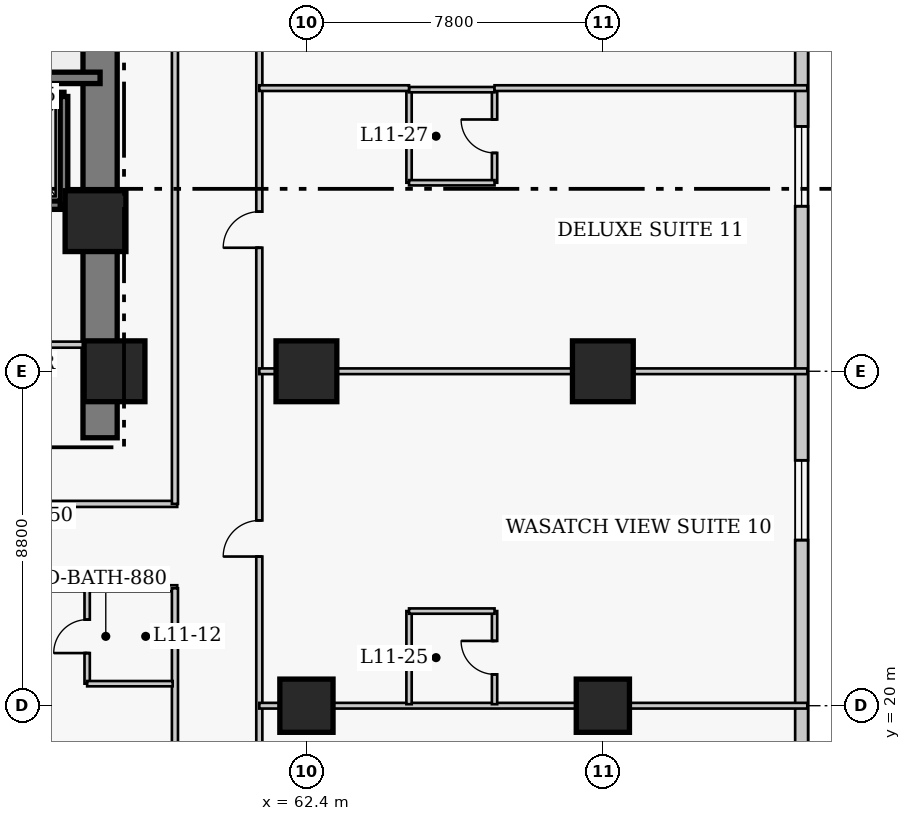
"""IFC4 building model, lengths in metres.
Left out: names, types, materials, properties, quantities, classifications, styles, units other than length and angle.
Written with IfcOpenShell. Run it as: python <this file> out.ifc"""

import sys

from ifc_helpers import new_model, si_unit, direction, frame, frame_2d, origin, origin_2d, place, context, subcontext, project, spatial, rectangle, extrude, element, fill, save


model = new_model("IFC4")
c1 = context("Model", 3, precision=1e-05, world=origin(), true_north=direction((0.0, 1.0)))
c2 = subcontext(c1, "Body", "Model", "MODEL_VIEW")
j1 = project(units=[si_unit("LENGTHUNIT", "METRE"), si_unit("PLANEANGLEUNIT", "RADIAN")], contexts=[c1])
p1 = place(None, origin())
s1 = spatial("IfcSite", under=j1, at=p1, CompositionType="ELEMENT")
p2 = place(p1, origin())
s2 = spatial("IfcBuilding", under=s1, at=p2, CompositionType="ELEMENT")
p3 = place(p2, frame((0.0, 0.0, 48.8)))
s3 = spatial("IfcBuildingStorey", under=s2, at=p3, CompositionType="ELEMENT", Elevation=48.8)
p4 = place(p3, frame((56.97, 27.05, 0.0), z_axis=(0.0, 0.0, 1.0), x_axis=(0.0, 1.0, 0.0)))
e1 = element("IfcWall", 1, at=p4, inside=s3, PredefinedType="SHEAR", context=c2, shape_type="SweptSolid", body=[
    extrude(rectangle(XDim=13.72, YDim=0.9, at=frame_2d((6.86, 0.0))), origin(), (0.0, 0.0, 1.0), 3.8),
])
p5 = place(p3, frame((48.45, 36.52, 0.0), z_axis=(0.0, 0.0, 1.0), x_axis=(1.0, 0.0, 0.0)))
e2 = element("IfcWall", 2, at=p5, inside=s3, PredefinedType="SHEAR", context=c2, shape_type="SweptSolid", body=[
    extrude(rectangle(XDim=8.52, YDim=0.3, at=frame_2d((4.26, 0.0))), origin(), (0.0, 0.0, 1.0), 3.8),
])
p6 = place(p3, frame((62.4, 20.0, 0.0), z_axis=(0.0, 0.0, 1.0), x_axis=(1.0, 0.0, 0.0)))
e3 = element("IfcColumn", 3, at=p6, inside=s3, PredefinedType="COLUMN", context=c2, shape_type="SweptSolid", body=[
    extrude(rectangle(XDim=1.4, YDim=1.4, at=origin_2d()), origin(), (0.0, 0.0, 1.0), 3.8),
])
p7 = place(p3, frame((62.4, 28.8, 0.0), z_axis=(0.0, 0.0, 1.0), x_axis=(1.0, 0.0, 0.0)))
e4 = element("IfcColumn", 4, at=p7, inside=s3, PredefinedType="COLUMN", context=c2, shape_type="SweptSolid", body=[
    extrude(rectangle(XDim=1.6, YDim=1.6, at=origin_2d()), origin(), (0.0, 0.0, 1.0), 3.8),
])
p8 = place(p3, frame((70.2, 20.0, 0.0), z_axis=(0.0, 0.0, 1.0), x_axis=(1.0, 0.0, 0.0)))
e5 = element("IfcColumn", 5, at=p8, inside=s3, PredefinedType="COLUMN", context=c2, shape_type="SweptSolid", body=[
    extrude(rectangle(XDim=1.4, YDim=1.4, at=origin_2d()), origin(), (0.0, 0.0, 1.0), 3.8),
])
for number, where, z_axis, x_axis in (
    (6, (70.2, 28.8, 0.0), (0.0, 0.0, 1.0), (1.0, 0.0, 0.0)),
    (7, (57.35, 28.8, 0.0), (0.0, 0.0, 1.0), (1.0, 0.0, 0.0)),
    (8, (56.85, 32.75, 0.0), (0.0, 0.0, 1.0), (1.0, 0.0, 0.0)),
):
    element("IfcColumn", number, at=place(p3, frame(where, z_axis=z_axis, x_axis=x_axis)), inside=s3, PredefinedType="COLUMN", context=c2, shape_type="SweptSolid", body=[
        extrude(rectangle(XDim=1.6, YDim=1.6, at=origin_2d()), origin(), (0.0, 0.0, 1.0), 3.8),
    ])
p9 = place(p3, frame((75.43, 12.23, 0.0), z_axis=(0.0, 0.0, 1.0), x_axis=(0.0, 1.0, 0.0)))
e9 = element("IfcWall", 9, at=p9, inside=s3, PredefinedType="SOLIDWALL", context=c2, shape_type="SweptSolid", body=[
    extrude(rectangle(XDim=35.14, YDim=0.34, at=frame_2d((17.57, 0.0))), origin(), (0.0, 0.0, 1.0), 3.54),
])
p10 = place(p9, frame((3.343, 0.0, 0.85)))
e10 = element("IfcOpeningElement", 10, at=p10, cuts=e9, PredefinedType="OPENING", context=c2, shape_type="SweptSolid", body=[
    extrude(rectangle(XDim=2.1, YDim=1.85, at=frame_2d((1.05, 0.925))), frame((0.0, 0.18, 0.0), z_axis=(0.0, -1.0, 0.0), x_axis=(1.0, 0.0, 0.0)), (0.0, 0.0, 1.0), 0.36),
])
p11 = place(p9, frame((12.127, 0.0, 0.85)))
e11 = element("IfcOpeningElement", 11, at=p11, cuts=e9, PredefinedType="OPENING", context=c2, shape_type="SweptSolid", body=[
    extrude(rectangle(XDim=2.1, YDim=1.85, at=frame_2d((1.05, 0.925))), frame((0.0, 0.18, 0.0), z_axis=(0.0, -1.0, 0.0), x_axis=(1.0, 0.0, 0.0)), (0.0, 0.0, 1.0), 0.36),
])
p12 = place(p9, frame((20.913, 0.0, 0.85)))
e12 = element("IfcOpeningElement", 12, at=p12, cuts=e9, PredefinedType="OPENING", context=c2, shape_type="SweptSolid", body=[
    extrude(rectangle(XDim=2.1, YDim=1.85, at=frame_2d((1.05, 0.925))), frame((0.0, 0.18, 0.0), z_axis=(0.0, -1.0, 0.0), x_axis=(1.0, 0.0, 0.0)), (0.0, 0.0, 1.0), 0.36),
])
p13 = place(p9, frame((29.698, 0.0, 0.85)))
e13 = element("IfcOpeningElement", 13, at=p13, cuts=e9, PredefinedType="OPENING", context=c2, shape_type="SweptSolid", body=[
    extrude(rectangle(XDim=2.1, YDim=1.85, at=frame_2d((1.05, 0.925))), frame((0.0, 0.18, 0.0), z_axis=(0.0, -1.0, 0.0), x_axis=(1.0, 0.0, 0.0)), (0.0, 0.0, 1.0), 0.36),
])
p14 = place(p3, frame((53.6, 36.03, 0.0), z_axis=(0.0, 0.0, 1.0), x_axis=(1.0, 0.0, 0.0)))
e14 = element("IfcWall", 14, at=p14, inside=s3, PredefinedType="SHEAR", context=c2, shape_type="SweptSolid", body=[
    extrude(rectangle(XDim=2.42, YDim=0.22, at=frame_2d((1.21, 0.0))), origin(), (0.0, 0.0, 1.0), 3.8),
])
p15 = place(p3, frame((53.6, 33.17, 0.0), z_axis=(0.0, 0.0, 1.0), x_axis=(1.0, 0.0, 0.0)))
e15 = element("IfcWall", 15, at=p15, inside=s3, PredefinedType="SHEAR", context=c2, shape_type="SweptSolid", body=[
    extrude(rectangle(XDim=2.42, YDim=0.22, at=frame_2d((1.21, 0.0))), origin(), (0.0, 0.0, 1.0), 3.8),
])
p16 = place(p15, frame((0.65, 0.0, 0.0)))
e16 = element("IfcOpeningElement", 16, at=p16, cuts=e15, PredefinedType="OPENING", context=c2, shape_type="SweptSolid", body=[
    extrude(rectangle(XDim=1.3, YDim=2.15, at=frame_2d((0.65, 1.075))), frame((0.0, 0.12, 0.0), z_axis=(0.0, -1.0, 0.0), x_axis=(1.0, 0.0, 0.0)), (0.0, 0.0, 1.0), 0.24),
])
p17 = place(p3, frame((56.02, 33.17, 0.0), z_axis=(0.0, 0.0, 1.0), x_axis=(0.0, 1.0, 0.0)))
e17 = element("IfcWall", 17, at=p17, inside=s3, PredefinedType="SHEAR", context=c2, shape_type="SweptSolid", body=[
    extrude(rectangle(XDim=2.86, YDim=0.2, at=frame_2d((1.43, 0.0))), origin(), (0.0, 0.0, 1.0), 3.8),
])
p18 = place(p3, frame((51.12, 29.5, 0.0), z_axis=(0.0, 0.0, 1.0), x_axis=(1.0, 0.0, 0.0)))
e18 = element("IfcWall", 18, at=p18, inside=s3, PredefinedType="PARTITIONING", context=c2, shape_type="SweptSolid", body=[
    extrude(rectangle(XDim=5.63, YDim=0.16, at=frame_2d((2.815, 0.0))), origin(), (0.0, 0.0, 1.0), 3.54),
])
p19 = place(p3, frame((35.85, 25.31, 0.0), z_axis=(0.0, 0.0, 1.0), x_axis=(1.0, 0.0, 0.0)))
e19 = element("IfcWall", 19, at=p19, inside=s3, PredefinedType="PARTITIONING", context=c2, shape_type="SweptSolid", body=[
    extrude(rectangle(XDim=23.15, YDim=0.16, at=frame_2d((11.575, 0.0))), origin(), (0.0, 0.0, 1.0), 3.54),
])
p20 = place(p3, frame((35.8, 23.09, 0.0), z_axis=(0.0, 0.0, 1.0), x_axis=(1.0, 0.0, 0.0)))
e20 = element("IfcWall", 20, at=p20, inside=s3, PredefinedType="PARTITIONING", context=c2, shape_type="SweptSolid", body=[
    extrude(rectangle(XDim=23.2, YDim=0.16, at=frame_2d((11.6, 0.0))), origin(), (0.0, 0.0, 1.0), 3.54),
])
p21 = place(p20, frame((3.907, 0.0, 0.0)))
e21 = element("IfcOpeningElement", 21, at=p21, cuts=e20, PredefinedType="OPENING", context=c2, shape_type="SweptSolid", body=[
    extrude(rectangle(XDim=1.0, YDim=2.15, at=frame_2d((0.5, 1.075))), frame((0.0, 0.09, 0.0), z_axis=(0.0, -1.0, 0.0), x_axis=(1.0, 0.0, 0.0)), (0.0, 0.0, 1.0), 0.18),
])
p22 = place(p20, frame((11.04, 0.0, 0.0)))
e22 = element("IfcOpeningElement", 22, at=p22, cuts=e20, PredefinedType="OPENING", context=c2, shape_type="SweptSolid", body=[
    extrude(rectangle(XDim=0.95, YDim=2.1, at=frame_2d((0.475, 1.05))), frame((0.0, 0.09, 0.0), z_axis=(0.0, -1.0, 0.0), x_axis=(1.0, 0.0, 0.0)), (0.0, 0.0, 1.0), 0.18),
])
p23 = place(p20, frame((18.203, 0.0, 0.0)))
e23 = element("IfcOpeningElement", 23, at=p23, cuts=e20, PredefinedType="OPENING", context=c2, shape_type="SweptSolid", body=[
    extrude(rectangle(XDim=0.95, YDim=2.1, at=frame_2d((0.475, 1.05))), frame((0.0, 0.09, 0.0), z_axis=(0.0, -1.0, 0.0), x_axis=(1.0, 0.0, 0.0)), (0.0, 0.0, 1.0), 0.18),
])
p24 = place(p3, frame((61.16, 10.25, 0.0), z_axis=(0.0, 0.0, 1.0), x_axis=(0.0, 1.0, 0.0)))
e24 = element("IfcWall", 24, at=p24, inside=s3, PredefinedType="PARTITIONING", context=c2, shape_type="SweptSolid", body=[
    extrude(rectangle(XDim=30.4, YDim=0.16, at=frame_2d((15.2, 0.0))), origin(), (0.0, 0.0, 1.0), 3.54),
])
p25 = place(p24, frame((4.4, 0.0, 0.0)))
e25 = element("IfcOpeningElement", 25, at=p25, cuts=e24, PredefinedType="OPENING", context=c2, shape_type="SweptSolid", body=[
    extrude(rectangle(XDim=0.95, YDim=2.1, at=frame_2d((0.475, 1.05))), frame((0.0, 0.09, 0.0), z_axis=(0.0, -1.0, 0.0), x_axis=(1.0, 0.0, 0.0)), (0.0, 0.0, 1.0), 0.18),
])
p26 = place(p24, frame((13.675, 0.0, 0.0)))
e26 = element("IfcOpeningElement", 26, at=p26, cuts=e24, PredefinedType="OPENING", context=c2, shape_type="SweptSolid", body=[
    extrude(rectangle(XDim=0.95, YDim=2.1, at=frame_2d((0.475, 1.05))), frame((0.0, 0.09, 0.0), z_axis=(0.0, -1.0, 0.0), x_axis=(1.0, 0.0, 0.0)), (0.0, 0.0, 1.0), 0.18),
])
p27 = place(p24, frame((21.8, 0.0, 0.0)))
e27 = element("IfcOpeningElement", 27, at=p27, cuts=e24, PredefinedType="OPENING", context=c2, shape_type="SweptSolid", body=[
    extrude(rectangle(XDim=0.95, YDim=2.1, at=frame_2d((0.475, 1.05))), frame((0.0, 0.09, 0.0), z_axis=(0.0, -1.0, 0.0), x_axis=(1.0, 0.0, 0.0)), (0.0, 0.0, 1.0), 0.18),
])
p28 = place(p24, frame((28.96, 0.0, 0.0)))
e28 = element("IfcOpeningElement", 28, at=p28, cuts=e24, PredefinedType="OPENING", context=c2, shape_type="SweptSolid", body=[
    extrude(rectangle(XDim=1.0, YDim=2.15, at=frame_2d((0.5, 1.075))), frame((0.0, 0.09, 0.0), z_axis=(0.0, -1.0, 0.0), x_axis=(1.0, 0.0, 0.0)), (0.0, 0.0, 1.0), 0.18),
])
p29 = place(p3, frame((58.94, 25.31, 0.0), z_axis=(0.0, 0.0, 1.0), x_axis=(0.0, 1.0, 0.0)))
e29 = element("IfcWall", 29, at=p29, inside=s3, PredefinedType="PARTITIONING", context=c2, shape_type="SweptSolid", body=[
    extrude(rectangle(XDim=15.34, YDim=0.16, at=frame_2d((7.67, 0.0))), origin(), (0.0, 0.0, 1.0), 3.54),
])
p30 = place(p3, frame((58.94, 10.25, 0.0), z_axis=(0.0, 0.0, 1.0), x_axis=(0.0, 1.0, 0.0)))
e30 = element("IfcWall", 30, at=p30, inside=s3, PredefinedType="PARTITIONING", context=c2, shape_type="SweptSolid", body=[
    extrude(rectangle(XDim=12.84, YDim=0.16, at=frame_2d((6.42, 0.0))), origin(), (0.0, 0.0, 1.0), 3.54),
])
p31 = place(p3, frame((56.63, 20.58, 0.0), z_axis=(0.0, 0.0, 1.0), x_axis=(0.0, 1.0, 0.0)))
e31 = element("IfcWall", 31, at=p31, inside=s3, PredefinedType="PLUMBINGWALL", context=c2, shape_type="SweptSolid", body=[
    extrude(rectangle(XDim=2.49, YDim=0.14, at=frame_2d((1.245, 0.0))), origin(), (0.0, 0.0, 1.0), 3.54),
])
p32 = place(p31, frame((0.805, 0.0, 0.0)))
e32 = element("IfcOpeningElement", 32, at=p32, cuts=e31, PredefinedType="OPENING", context=c2, shape_type="SweptSolid", body=[
    extrude(rectangle(XDim=0.88, YDim=2.05, at=frame_2d((0.44, 1.025))), frame((0.0, 0.08, 0.0), z_axis=(0.0, -1.0, 0.0), x_axis=(1.0, 0.0, 0.0)), (0.0, 0.0, 1.0), 0.16),
])
p33 = place(p3, frame((56.63, 20.58, 0.0), z_axis=(0.0, 0.0, 1.0), x_axis=(1.0, 0.0, 0.0)))
e33 = element("IfcWall", 33, at=p33, inside=s3, PredefinedType="PLUMBINGWALL", context=c2, shape_type="SweptSolid", body=[
    extrude(rectangle(XDim=2.25, YDim=0.14, at=frame_2d((1.125, 0.0))), origin(), (0.0, 0.0, 1.0), 3.54),
])
p34 = place(p3, frame((61.16, 20.0, 0.0), z_axis=(0.0, 0.0, 1.0), x_axis=(1.0, 0.0, 0.0)))
e34 = element("IfcWall", 34, at=p34, inside=s3, PredefinedType="PARTITIONING", context=c2, shape_type="SweptSolid", body=[
    extrude(rectangle(XDim=14.42, YDim=0.15, at=frame_2d((7.21, 0.0))), origin(), (0.0, 0.0, 1.0), 2.593),
])
p35 = place(p3, frame((65.1, 20.04, 0.0), z_axis=(0.0, 0.0, 1.0), x_axis=(0.0, 1.0, 0.0)))
e35 = element("IfcWall", 35, at=p35, inside=s3, PredefinedType="PLUMBINGWALL", context=c2, shape_type="SweptSolid", body=[
    extrude(rectangle(XDim=2.45, YDim=0.14, at=frame_2d((1.225, 0.0))), origin(), (0.0, 0.0, 1.0), 3.54),
])
p36 = place(p3, frame((67.35, 20.04, 0.0), z_axis=(0.0, 0.0, 1.0), x_axis=(0.0, 1.0, 0.0)))
e36 = element("IfcWall", 36, at=p36, inside=s3, PredefinedType="PLUMBINGWALL", context=c2, shape_type="SweptSolid", body=[
    extrude(rectangle(XDim=2.45, YDim=0.14, at=frame_2d((1.225, 0.0))), origin(), (0.0, 0.0, 1.0), 3.54),
])
p37 = place(p36, frame((0.785, 0.0, 0.0)))
e37 = element("IfcOpeningElement", 37, at=p37, cuts=e36, PredefinedType="OPENING", context=c2, shape_type="SweptSolid", body=[
    extrude(rectangle(XDim=0.88, YDim=2.05, at=frame_2d((0.44, 1.025))), frame((0.0, 0.08, 0.0), z_axis=(0.0, -1.0, 0.0), x_axis=(1.0, 0.0, 0.0)), (0.0, 0.0, 1.0), 0.16),
])
p38 = place(p3, frame((65.1, 22.49, 0.0), z_axis=(0.0, 0.0, 1.0), x_axis=(1.0, 0.0, 0.0)))
e38 = element("IfcWall", 38, at=p38, inside=s3, PredefinedType="PLUMBINGWALL", context=c2, shape_type="SweptSolid", body=[
    extrude(rectangle(XDim=2.25, YDim=0.14, at=frame_2d((1.125, 0.0))), origin(), (0.0, 0.0, 1.0), 3.54),
])
p39 = place(p3, frame((61.16, 28.8, 0.0), z_axis=(0.0, 0.0, 1.0), x_axis=(1.0, 0.0, 0.0)))
e39 = element("IfcWall", 39, at=p39, inside=s3, PredefinedType="PARTITIONING", context=c2, shape_type="SweptSolid", body=[
    extrude(rectangle(XDim=14.42, YDim=0.15, at=frame_2d((7.21, 0.0))), origin(), (0.0, 0.0, 1.0), 2.593),
])
p40 = place(p3, frame((65.1, 33.76, 0.0), z_axis=(0.0, 0.0, 1.0), x_axis=(0.0, 1.0, 0.0)))
e40 = element("IfcWall", 40, at=p40, inside=s3, PredefinedType="PLUMBINGWALL", context=c2, shape_type="SweptSolid", body=[
    extrude(rectangle(XDim=2.45, YDim=0.14, at=frame_2d((1.225, 0.0))), origin(), (0.0, 0.0, 1.0), 3.54),
])
p41 = place(p3, frame((67.35, 33.76, 0.0), z_axis=(0.0, 0.0, 1.0), x_axis=(0.0, 1.0, 0.0)))
e41 = element("IfcWall", 41, at=p41, inside=s3, PredefinedType="PLUMBINGWALL", context=c2, shape_type="SweptSolid", body=[
    extrude(rectangle(XDim=2.45, YDim=0.14, at=frame_2d((1.225, 0.0))), origin(), (0.0, 0.0, 1.0), 3.54),
])
p42 = place(p41, frame((0.785, 0.0, 0.0)))
e42 = element("IfcOpeningElement", 42, at=p42, cuts=e41, PredefinedType="OPENING", context=c2, shape_type="SweptSolid", body=[
    extrude(rectangle(XDim=0.88, YDim=2.05, at=frame_2d((0.44, 1.025))), frame((0.0, 0.08, 0.0), z_axis=(0.0, -1.0, 0.0), x_axis=(1.0, 0.0, 0.0)), (0.0, 0.0, 1.0), 0.16),
])
for number, where, z_axis, x_axis in (
    (43, (65.1, 33.76, 0.0), (0.0, 0.0, 1.0), (1.0, 0.0, 0.0)),
    (44, (65.1, 36.21, 0.0), (0.0, 0.0, 1.0), (1.0, 0.0, 0.0)),
):
    element("IfcWall", number, at=place(p3, frame(where, z_axis=z_axis, x_axis=x_axis)), inside=s3, PredefinedType="PLUMBINGWALL", context=c2, shape_type="SweptSolid", body=[
        extrude(rectangle(XDim=2.25, YDim=0.14, at=frame_2d((1.125, 0.0))), origin(), (0.0, 0.0, 1.0), 3.54),
    ])
p43 = place(p3, frame((61.16, 36.25, 0.0), z_axis=(0.0, 0.0, 1.0), x_axis=(1.0, 0.0, 0.0)))
e45 = element("IfcWall", 45, at=p43, inside=s3, PredefinedType="PARTITIONING", context=c2, shape_type="SweptSolid", body=[
    extrude(rectangle(XDim=3.94, YDim=0.15, at=frame_2d((1.97, 0.0))), origin(), (0.0, 0.0, 1.0), 3.54),
])
p44 = place(p3, frame((67.35, 36.25, 0.0), z_axis=(0.0, 0.0, 1.0), x_axis=(1.0, 0.0, 0.0)))
e46 = element("IfcWall", 46, at=p44, inside=s3, PredefinedType="PARTITIONING", context=c2, shape_type="SweptSolid", body=[
    extrude(rectangle(XDim=8.23, YDim=0.15, at=frame_2d((4.115, 0.0))), origin(), (0.0, 0.0, 1.0), 3.54),
])
p45 = place(p11, origin())
e47 = element("IfcWindow", 47, at=p45, inside=s3, PartitioningType="SINGLE_PANEL", PredefinedType="WINDOW", context=c2, shape_type="SweptSolid", body=[
    extrude(rectangle(XDim=2.1, YDim=1.85, at=frame_2d((1.05, 0.925))), frame((0.0, 0.03, 0.0), z_axis=(0.0, -1.0, 0.0), x_axis=(1.0, 0.0, 0.0)), (0.0, 0.0, 1.0), 0.06),
])
fill(e11, e47)
p46 = place(p12, origin())
e48 = element("IfcWindow", 48, at=p46, inside=s3, PartitioningType="SINGLE_PANEL", PredefinedType="WINDOW", context=c2, shape_type="SweptSolid", body=[
    extrude(rectangle(XDim=2.1, YDim=1.85, at=frame_2d((1.05, 0.925))), frame((0.0, 0.03, 0.0), z_axis=(0.0, -1.0, 0.0), x_axis=(1.0, 0.0, 0.0)), (0.0, 0.0, 1.0), 0.06),
])
fill(e12, e48)
p47 = place(p32, origin())
e49 = element("IfcDoor", 49, at=p47, inside=s3, OperationType="SINGLE_SWING_LEFT", PredefinedType="DOOR", context=c2, shape_type="SweptSolid", body=[
    extrude(rectangle(XDim=0.88, YDim=2.05, at=frame_2d((0.44, 1.025))), frame((0.0, 0.025, 0.0), z_axis=(0.0, -1.0, 0.0), x_axis=(1.0, 0.0, 0.0)), (0.0, 0.0, 1.0), 0.05),
])
fill(e32, e49)
p48 = place(p37, origin())
e50 = element("IfcDoor", 50, at=p48, inside=s3, OperationType="SINGLE_SWING_RIGHT", PredefinedType="DOOR", context=c2, shape_type="SweptSolid", body=[
    extrude(rectangle(XDim=0.88, YDim=2.05, at=frame_2d((0.44, 1.025))), frame((0.0, 0.025, 0.0), z_axis=(0.0, -1.0, 0.0), x_axis=(1.0, 0.0, 0.0)), (0.0, 0.0, 1.0), 0.05),
])
fill(e37, e50)
p49 = place(p26, origin())
e51 = element("IfcDoor", 51, at=p49, inside=s3, OperationType="SINGLE_SWING_LEFT", PredefinedType="DOOR", context=c2, shape_type="SweptSolid", body=[
    extrude(rectangle(XDim=0.95, YDim=2.1, at=frame_2d((0.475, 1.05))), frame((0.0, 0.025, 0.0), z_axis=(0.0, -1.0, 0.0), x_axis=(1.0, 0.0, 0.0)), (0.0, 0.0, 1.0), 0.05),
])
fill(e26, e51)
p50 = place(p42, origin())
e52 = element("IfcDoor", 52, at=p50, inside=s3, OperationType="SINGLE_SWING_RIGHT", PredefinedType="DOOR", context=c2, shape_type="SweptSolid", body=[
    extrude(rectangle(XDim=0.88, YDim=2.05, at=frame_2d((0.44, 1.025))), frame((0.0, 0.025, 0.0), z_axis=(0.0, -1.0, 0.0), x_axis=(1.0, 0.0, 0.0)), (0.0, 0.0, 1.0), 0.05),
])
fill(e42, e52)
p51 = place(p27, origin())
e53 = element("IfcDoor", 53, at=p51, inside=s3, OperationType="SINGLE_SWING_LEFT", PredefinedType="DOOR", context=c2, shape_type="SweptSolid", body=[
    extrude(rectangle(XDim=0.95, YDim=2.1, at=frame_2d((0.475, 1.05))), frame((0.0, 0.025, 0.0), z_axis=(0.0, -1.0, 0.0), x_axis=(1.0, 0.0, 0.0)), (0.0, 0.0, 1.0), 0.05),
])
fill(e27, e53)
save(model, sys.argv[1])
